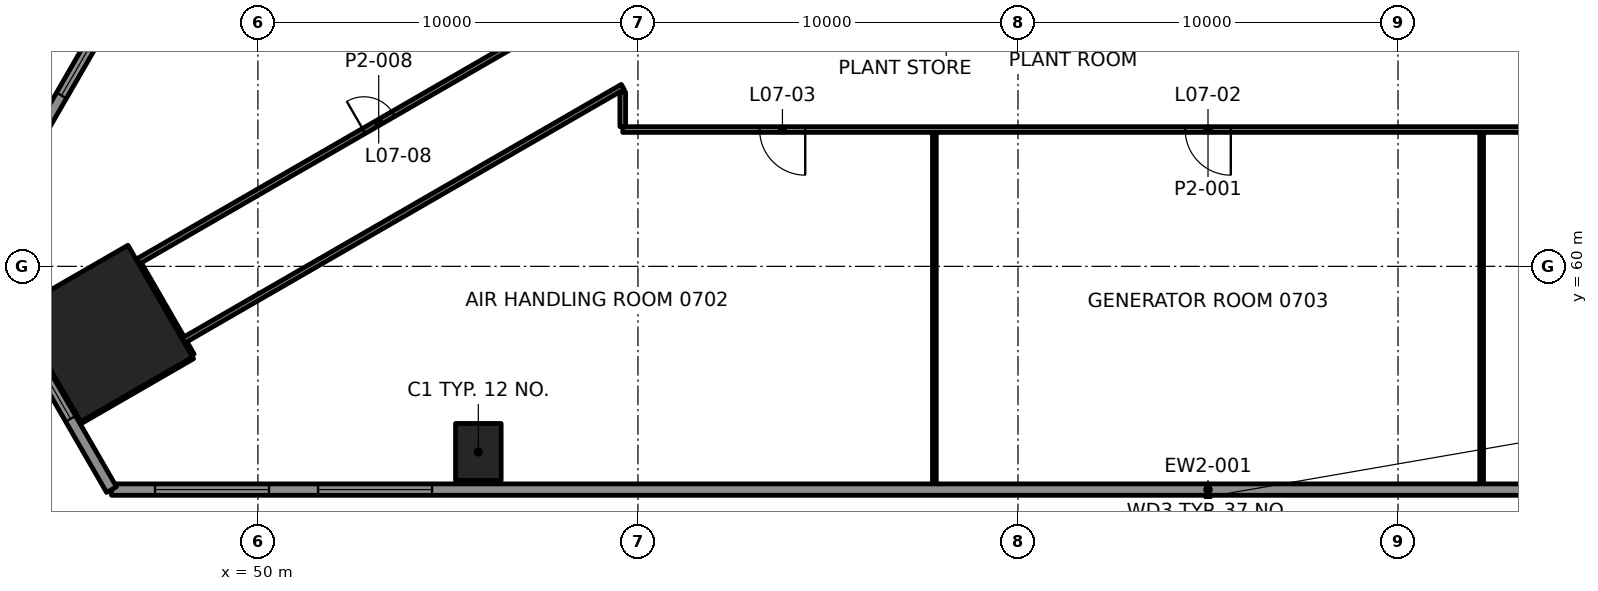
"""IFC4 building model, lengths in metres.
Left out: names, types, materials, properties, quantities, classifications, styles, units other than length and angle.
Written with IfcOpenShell. Run it as: python <this file> out.ifc"""

import sys

from ifc_helpers import new_model, si_unit, direction, frame, frame_2d, origin, origin_2d, place, context, subcontext, project, spatial, rectangle, extrude, element, fill, save


model = new_model("IFC4")
c1 = context("Model", 3, precision=1e-05, world=origin(), true_north=direction((0.0, 1.0)))
c2 = subcontext(c1, "Body", "Model", "MODEL_VIEW")
j1 = project(units=[si_unit("LENGTHUNIT", "METRE"), si_unit("PLANEANGLEUNIT", "RADIAN")], contexts=[c1])
p1 = place(None, origin())
s1 = spatial("IfcSite", under=j1, at=p1, CompositionType="ELEMENT")
p2 = place(p1, origin())
s2 = spatial("IfcBuilding", under=s1, at=p2, CompositionType="ELEMENT")
p3 = place(p2, frame((0.0, 0.0, 35.5)))
s3 = spatial("IfcBuildingStorey", under=s2, at=p3, CompositionType="ELEMENT", Elevation=35.5)
p4 = place(p3, frame((45.959, 58.233, 0.0), z_axis=(0.0, 0.0, 1.0), x_axis=(0.5, -0.866025403784, 0.0)))
e1 = element("IfcColumn", 1, at=p4, inside=s3, PredefinedType="COLUMN", context=c2, shape_type="SweptSolid", body=[
    extrude(rectangle(XDim=3.4, YDim=3.4, at=origin_2d()), origin(), (0.0, 0.0, 1.0), 4.5),
])
p5 = place(p3, frame((55.8, 55.115, -0.0), z_axis=(0.0, 0.0, 1.0), x_axis=(1.0, 0.0, 0.0)))
e2 = element("IfcColumn", 2, at=p5, inside=s3, PredefinedType="COLUMN", context=c2, shape_type="SweptSolid", body=[
    extrude(rectangle(XDim=1.2, YDim=1.5, at=origin_2d()), origin(), (0.0, 0.0, 1.0), 4.5),
])
p6 = place(p3, frame((90.4, 63.6, 0.0), z_axis=(0.0, 0.0, 1.0), x_axis=(-1.0, 0.0, 0.0)))
e3 = element("IfcWall", 3, at=p6, inside=s3, PredefinedType="PARTITIONING", context=c2, shape_type="SweptSolid", body=[
    extrude(rectangle(XDim=30.799, YDim=0.15, at=frame_2d((15.4, 0.0))), origin(), (0.0, 0.0, 1.0), 3.7),
])
p7 = place(p6, frame((3.751, 0.0, 0.0)))
e4 = element("IfcOpeningElement", 4, at=p7, cuts=e3, PredefinedType="OPENING", context=c2, shape_type="SweptSolid", body=[
    extrude(rectangle(XDim=0.9, YDim=2.1, at=frame_2d((0.45, 1.05))), frame((0.0, 0.085, 0.0), z_axis=(0.0, -1.0, 0.0), x_axis=(1.0, 0.0, 0.0)), (0.0, 0.0, 1.0), 0.17),
])
p8 = place(p6, frame((14.8, 0.0, 0.0)))
e5 = element("IfcOpeningElement", 5, at=p8, cuts=e3, PredefinedType="OPENING", context=c2, shape_type="SweptSolid", body=[
    extrude(rectangle(XDim=1.2, YDim=2.1, at=frame_2d((0.6, 1.05))), frame((0.0, 0.085, 0.0), z_axis=(0.0, -1.0, 0.0), x_axis=(1.0, 0.0, 0.0)), (0.0, 0.0, 1.0), 0.17),
])
p9 = place(p6, frame((25.998, 0.0, 0.0)))
e6 = element("IfcOpeningElement", 6, at=p9, cuts=e3, PredefinedType="OPENING", context=c2, shape_type="SweptSolid", body=[
    extrude(rectangle(XDim=1.2, YDim=2.1, at=frame_2d((0.6, 1.05))), frame((0.0, 0.085, 0.0), z_axis=(0.0, -1.0, 0.0), x_axis=(1.0, 0.0, 0.0)), (0.0, 0.0, 1.0), 0.17),
])
p10 = place(p3, frame((45.198, 55.831, 0.0), z_axis=(0.0, 0.0, 1.0), x_axis=(0.866014251095, 0.500019316528, 0.0)))
e7 = element("IfcWall", 7, at=p10, inside=s3, PredefinedType="PARTITIONING", context=c2, shape_type="SweptSolid", body=[
    extrude(rectangle(XDim=3.559, YDim=0.1, at=frame_2d((1.78, 0.0))), origin(), (0.0, 0.0, 1.0), 3.7),
])
p11 = place(p3, frame((48.031, 58.044, 0.0), z_axis=(0.0, 0.0, 1.0), x_axis=(0.866027935033, 0.499995615723, 0.0)))
e8 = element("IfcWall", 8, at=p11, inside=s3, PredefinedType="PARTITIONING", context=c2, shape_type="SweptSolid", body=[
    extrude(rectangle(XDim=13.358, YDim=0.15, at=frame_2d((6.679, 0.0))), origin(), (0.0, 0.0, 1.0), 3.547),
])
p12 = place(p3, frame((46.832, 60.123, 0.0), z_axis=(0.0, 0.0, 1.0), x_axis=(0.866022484069, 0.500005057062, 0.0)))
e9 = element("IfcWall", 9, at=p12, inside=s3, PredefinedType="PARTITIONING", context=c2, shape_type="SweptSolid", body=[
    extrude(rectangle(XDim=14.657, YDim=0.15, at=frame_2d((7.329, 0.0))), origin(), (0.0, 0.0, 1.0), 3.7),
])
p13 = place(p12, frame((6.879, 0.0, 0.0)))
e10 = element("IfcOpeningElement", 10, at=p13, cuts=e9, PredefinedType="OPENING", context=c2, shape_type="SweptSolid", body=[
    extrude(rectangle(XDim=0.9, YDim=2.1, at=frame_2d((0.45, 1.05))), frame((0.0, 0.085, 0.0), z_axis=(0.0, -1.0, 0.0), x_axis=(1.0, 0.0, 0.0)), (0.0, 0.0, 1.0), 0.17),
])
for number, where, z_axis, x_axis in (
    (11, (82.2, 54.155, 0.0), (0.0, 0.0, 1.0), (0.0, 1.0, 0.0)),
    (12, (67.8, 54.155, 0.0), (0.0, 0.0, 1.0), (0.0, 1.0, 0.0)),
):
    element("IfcWall", number, at=place(p3, frame(where, z_axis=z_axis, x_axis=x_axis)), inside=s3, PredefinedType="PARTITIONING", context=c2, shape_type="SweptSolid", body=[
        extrude(rectangle(XDim=9.37, YDim=0.1, at=frame_2d((4.685, 0.0))), origin(), (0.0, 0.0, 1.0), 3.7),
    ])
p14 = place(p3, frame((59.6, 63.676, 0.0), z_axis=(0.0, 0.0, 1.0), x_axis=(0.0, 1.0, 0.0)))
e13 = element("IfcWall", 13, at=p14, inside=s3, PredefinedType="PARTITIONING", context=c2, shape_type="SweptSolid", body=[
    extrude(rectangle(XDim=0.911, YDim=0.15, at=frame_2d((0.456, 0.0))), origin(), (0.0, 0.0, 1.0), 3.7),
])
p15 = place(p3, frame((48.256, 57.655, 0.0), z_axis=(0.0, 0.0, 1.0), x_axis=(-0.499854089722, 0.866109628736, 0.0)))
e14 = element("IfcWall", 14, at=p15, inside=s3, PredefinedType="PARTITIONING", context=c2, shape_type="SweptSolid", body=[
    extrude(rectangle(XDim=0.375, YDim=0.15, at=frame_2d((0.187, 0.0))), origin(), (0.0, 0.0, 1.0), 3.7),
])
p16 = place(p3, frame((47.993, 58.109, 0.0), z_axis=(0.0, 0.0, 1.0), x_axis=(-0.499944821793, 0.866057258594, 0.0)))
e15 = element("IfcWall", 15, at=p16, inside=s3, PredefinedType="PARTITIONING", context=c2, shape_type="SweptSolid", body=[
    extrude(rectangle(XDim=2.249, YDim=0.15, at=frame_2d((1.125, 0.0))), origin(), (0.0, 0.0, 1.0), 3.547),
])
p17 = place(p3, frame((46.148, 54.125, 0.0), z_axis=(0.0, 0.0, 1.0), x_axis=(1.0, 0.0, 0.0)))
e16 = element("IfcWall", 16, at=p17, inside=s3, PredefinedType="SOLIDWALL", context=c2, shape_type="SweptSolid", body=[
    extrude(rectangle(XDim=57.704, YDim=0.3, at=frame_2d((28.852, 0.0))), origin(), (0.0, 0.0, 1.0), 4.3),
])
p18 = place(p17, frame((1.145, 0.0, 0.8)))
e17 = element("IfcOpeningElement", 17, at=p18, cuts=e16, PredefinedType="OPENING", context=c2, shape_type="SweptSolid", body=[
    extrude(rectangle(XDim=3.0, YDim=2.4, at=frame_2d((1.5, 1.2))), frame((0.0, 0.16, 0.0), z_axis=(0.0, -1.0, 0.0), x_axis=(1.0, 0.0, 0.0)), (0.0, 0.0, 1.0), 0.32),
])
p19 = place(p17, frame((5.435, 0.0, 0.8)))
e18 = element("IfcOpeningElement", 18, at=p19, cuts=e16, PredefinedType="OPENING", context=c2, shape_type="SweptSolid", body=[
    extrude(rectangle(XDim=3.0, YDim=2.4, at=frame_2d((1.5, 1.2))), frame((0.0, 0.16, 0.0), z_axis=(0.0, -1.0, 0.0), x_axis=(1.0, 0.0, 0.0)), (0.0, 0.0, 1.0), 0.32),
])
p20 = place(p17, frame((49.269, 0.0, 0.8)))
e19 = element("IfcOpeningElement", 19, at=p20, cuts=e16, PredefinedType="OPENING", context=c2, shape_type="SweptSolid", body=[
    extrude(rectangle(XDim=3.0, YDim=2.4, at=frame_2d((1.5, 1.2))), frame((0.0, 0.16, 0.0), z_axis=(0.0, -1.0, 0.0), x_axis=(1.0, 0.0, 0.0)), (0.0, 0.0, 1.0), 0.32),
])
p21 = place(p17, frame((53.559, 0.0, 0.8)))
e20 = element("IfcOpeningElement", 20, at=p21, cuts=e16, PredefinedType="OPENING", context=c2, shape_type="SweptSolid", body=[
    extrude(rectangle(XDim=3.0, YDim=2.4, at=frame_2d((1.5, 1.2))), frame((0.0, 0.16, 0.0), z_axis=(0.0, -1.0, 0.0), x_axis=(1.0, 0.0, 0.0)), (0.0, 0.0, 1.0), 0.32),
])
p22 = place(p3, frame((107.504, 60.451, 0.0), z_axis=(0.0, 0.0, 1.0), x_axis=(-0.500000550228, 0.86602508611, 0.0)))
e21 = element("IfcWall", 21, at=p22, inside=s3, PredefinedType="SOLIDWALL", context=c2, shape_type="SweptSolid", body=[
    extrude(rectangle(XDim=57.704, YDim=0.3, at=frame_2d((28.852, 0.0))), origin(), (0.0, 0.0, 1.0), 4.3),
])
p23 = place(p22, frame((0.89, 0.0, 0.8)))
e22 = element("IfcOpeningElement", 22, at=p23, cuts=e21, PredefinedType="OPENING", context=c2, shape_type="SweptSolid", body=[
    extrude(rectangle(XDim=3.0, YDim=2.4, at=frame_2d((1.5, 1.2))), frame((0.0, 0.16, 0.0), z_axis=(0.0, -1.0, 0.0), x_axis=(1.0, 0.0, 0.0)), (0.0, 0.0, 1.0), 0.32),
])
p24 = place(p22, frame((4.67, 0.0, 0.8)))
e23 = element("IfcOpeningElement", 23, at=p24, cuts=e21, PredefinedType="OPENING", context=c2, shape_type="SweptSolid", body=[
    extrude(rectangle(XDim=3.0, YDim=2.4, at=frame_2d((1.5, 1.2))), frame((0.0, 0.16, 0.0), z_axis=(0.0, -1.0, 0.0), x_axis=(1.0, 0.0, 0.0)), (0.0, 0.0, 1.0), 0.32),
])
p25 = place(p22, frame((8.451, 0.0, 0.8)))
e24 = element("IfcOpeningElement", 24, at=p25, cuts=e21, PredefinedType="OPENING", context=c2, shape_type="SweptSolid", body=[
    extrude(rectangle(XDim=3.0, YDim=2.4, at=frame_2d((1.5, 1.2))), frame((0.0, 0.16, 0.0), z_axis=(0.0, -1.0, 0.0), x_axis=(1.0, 0.0, 0.0)), (0.0, 0.0, 1.0), 0.32),
])
p26 = place(p22, frame((12.231, 0.0, 0.8)))
e25 = element("IfcOpeningElement", 25, at=p26, cuts=e21, PredefinedType="OPENING", context=c2, shape_type="SweptSolid", body=[
    extrude(rectangle(XDim=3.0, YDim=2.4, at=frame_2d((1.5, 1.2))), frame((0.0, 0.16, 0.0), z_axis=(0.0, -1.0, 0.0), x_axis=(1.0, 0.0, 0.0)), (0.0, 0.0, 1.0), 0.32),
])
p27 = place(p22, frame((16.011, 0.0, 0.8)))
e26 = element("IfcOpeningElement", 26, at=p27, cuts=e21, PredefinedType="OPENING", context=c2, shape_type="SweptSolid", body=[
    extrude(rectangle(XDim=3.0, YDim=2.4, at=frame_2d((1.5, 1.2))), frame((0.0, 0.16, 0.0), z_axis=(0.0, -1.0, 0.0), x_axis=(1.0, 0.0, 0.0)), (0.0, 0.0, 1.0), 0.32),
])
p28 = place(p22, frame((19.792, 0.0, 0.8)))
e27 = element("IfcOpeningElement", 27, at=p28, cuts=e21, PredefinedType="OPENING", context=c2, shape_type="SweptSolid", body=[
    extrude(rectangle(XDim=3.0, YDim=2.4, at=frame_2d((1.5, 1.2))), frame((0.0, 0.16, 0.0), z_axis=(0.0, -1.0, 0.0), x_axis=(1.0, 0.0, 0.0)), (0.0, 0.0, 1.0), 0.32),
])
p29 = place(p22, frame((23.572, 0.0, 0.8)))
e28 = element("IfcOpeningElement", 28, at=p29, cuts=e21, PredefinedType="OPENING", context=c2, shape_type="SweptSolid", body=[
    extrude(rectangle(XDim=3.0, YDim=2.4, at=frame_2d((1.5, 1.2))), frame((0.0, 0.16, 0.0), z_axis=(0.0, -1.0, 0.0), x_axis=(1.0, 0.0, 0.0)), (0.0, 0.0, 1.0), 0.32),
])
p30 = place(p22, frame((27.352, 0.0, 0.8)))
e29 = element("IfcOpeningElement", 29, at=p30, cuts=e21, PredefinedType="OPENING", context=c2, shape_type="SweptSolid", body=[
    extrude(rectangle(XDim=3.0, YDim=2.4, at=frame_2d((1.5, 1.2))), frame((0.0, 0.16, 0.0), z_axis=(0.0, -1.0, 0.0), x_axis=(1.0, 0.0, 0.0)), (0.0, 0.0, 1.0), 0.32),
])
p31 = place(p22, frame((31.132, 0.0, 0.8)))
e30 = element("IfcOpeningElement", 30, at=p31, cuts=e21, PredefinedType="OPENING", context=c2, shape_type="SweptSolid", body=[
    extrude(rectangle(XDim=3.0, YDim=2.4, at=frame_2d((1.5, 1.2))), frame((0.0, 0.16, 0.0), z_axis=(0.0, -1.0, 0.0), x_axis=(1.0, 0.0, 0.0)), (0.0, 0.0, 1.0), 0.32),
])
p32 = place(p22, frame((34.913, 0.0, 0.8)))
e31 = element("IfcOpeningElement", 31, at=p32, cuts=e21, PredefinedType="OPENING", context=c2, shape_type="SweptSolid", body=[
    extrude(rectangle(XDim=3.0, YDim=2.4, at=frame_2d((1.5, 1.2))), frame((0.0, 0.16, 0.0), z_axis=(0.0, -1.0, 0.0), x_axis=(1.0, 0.0, 0.0)), (0.0, 0.0, 1.0), 0.32),
])
p33 = place(p22, frame((38.693, 0.0, 0.8)))
e32 = element("IfcOpeningElement", 32, at=p33, cuts=e21, PredefinedType="OPENING", context=c2, shape_type="SweptSolid", body=[
    extrude(rectangle(XDim=3.0, YDim=2.4, at=frame_2d((1.5, 1.2))), frame((0.0, 0.16, 0.0), z_axis=(0.0, -1.0, 0.0), x_axis=(1.0, 0.0, 0.0)), (0.0, 0.0, 1.0), 0.32),
])
p34 = place(p22, frame((42.473, 0.0, 0.8)))
e33 = element("IfcOpeningElement", 33, at=p34, cuts=e21, PredefinedType="OPENING", context=c2, shape_type="SweptSolid", body=[
    extrude(rectangle(XDim=3.0, YDim=2.4, at=frame_2d((1.5, 1.2))), frame((0.0, 0.16, 0.0), z_axis=(0.0, -1.0, 0.0), x_axis=(1.0, 0.0, 0.0)), (0.0, 0.0, 1.0), 0.32),
])
p35 = place(p22, frame((46.253, 0.0, 0.8)))
e34 = element("IfcOpeningElement", 34, at=p35, cuts=e21, PredefinedType="OPENING", context=c2, shape_type="SweptSolid", body=[
    extrude(rectangle(XDim=3.0, YDim=2.4, at=frame_2d((1.5, 1.2))), frame((0.0, 0.16, 0.0), z_axis=(0.0, -1.0, 0.0), x_axis=(1.0, 0.0, 0.0)), (0.0, 0.0, 1.0), 0.32),
])
p36 = place(p22, frame((50.033, 0.0, 0.8)))
e35 = element("IfcOpeningElement", 35, at=p36, cuts=e21, PredefinedType="OPENING", context=c2, shape_type="SweptSolid", body=[
    extrude(rectangle(XDim=3.0, YDim=2.4, at=frame_2d((1.5, 1.2))), frame((0.0, 0.16, 0.0), z_axis=(0.0, -1.0, 0.0), x_axis=(1.0, 0.0, 0.0)), (0.0, 0.0, 1.0), 0.32),
])
p37 = place(p22, frame((53.814, 0.0, 0.8)))
e36 = element("IfcOpeningElement", 36, at=p37, cuts=e21, PredefinedType="OPENING", context=c2, shape_type="SweptSolid", body=[
    extrude(rectangle(XDim=3.0, YDim=2.4, at=frame_2d((1.5, 1.2))), frame((0.0, 0.16, 0.0), z_axis=(0.0, -1.0, 0.0), x_axis=(1.0, 0.0, 0.0)), (0.0, 0.0, 1.0), 0.32),
])
p38 = place(p3, frame((71.348, 110.424, 0.0), z_axis=(0.0, 0.0, 1.0), x_axis=(-0.500000550228, -0.86602508611, 0.0)))
e37 = element("IfcWall", 37, at=p38, inside=s3, PredefinedType="SOLIDWALL", context=c2, shape_type="SweptSolid", body=[
    extrude(rectangle(XDim=57.704, YDim=0.3, at=frame_2d((28.852, 0.0))), origin(), (0.0, 0.0, 1.0), 4.3),
])
p39 = place(p38, frame((0.89, 0.0, 0.8)))
e38 = element("IfcOpeningElement", 38, at=p39, cuts=e37, PredefinedType="OPENING", context=c2, shape_type="SweptSolid", body=[
    extrude(rectangle(XDim=3.0, YDim=2.4, at=frame_2d((1.5, 1.2))), frame((0.0, 0.16, 0.0), z_axis=(0.0, -1.0, 0.0), x_axis=(1.0, 0.0, 0.0)), (0.0, 0.0, 1.0), 0.32),
])
p40 = place(p38, frame((4.67, 0.0, 0.8)))
e39 = element("IfcOpeningElement", 39, at=p40, cuts=e37, PredefinedType="OPENING", context=c2, shape_type="SweptSolid", body=[
    extrude(rectangle(XDim=3.0, YDim=2.4, at=frame_2d((1.5, 1.2))), frame((0.0, 0.16, 0.0), z_axis=(0.0, -1.0, 0.0), x_axis=(1.0, 0.0, 0.0)), (0.0, 0.0, 1.0), 0.32),
])
p41 = place(p38, frame((8.451, 0.0, 0.8)))
e40 = element("IfcOpeningElement", 40, at=p41, cuts=e37, PredefinedType="OPENING", context=c2, shape_type="SweptSolid", body=[
    extrude(rectangle(XDim=3.0, YDim=2.4, at=frame_2d((1.5, 1.2))), frame((0.0, 0.16, 0.0), z_axis=(0.0, -1.0, 0.0), x_axis=(1.0, 0.0, 0.0)), (0.0, 0.0, 1.0), 0.32),
])
p42 = place(p38, frame((12.231, 0.0, 0.8)))
e41 = element("IfcOpeningElement", 41, at=p42, cuts=e37, PredefinedType="OPENING", context=c2, shape_type="SweptSolid", body=[
    extrude(rectangle(XDim=3.0, YDim=2.4, at=frame_2d((1.5, 1.2))), frame((0.0, 0.16, 0.0), z_axis=(0.0, -1.0, 0.0), x_axis=(1.0, 0.0, 0.0)), (0.0, 0.0, 1.0), 0.32),
])
p43 = place(p38, frame((16.011, 0.0, 0.8)))
e42 = element("IfcOpeningElement", 42, at=p43, cuts=e37, PredefinedType="OPENING", context=c2, shape_type="SweptSolid", body=[
    extrude(rectangle(XDim=3.0, YDim=2.4, at=frame_2d((1.5, 1.2))), frame((0.0, 0.16, 0.0), z_axis=(0.0, -1.0, 0.0), x_axis=(1.0, 0.0, 0.0)), (0.0, 0.0, 1.0), 0.32),
])
p44 = place(p38, frame((19.792, 0.0, 0.8)))
e43 = element("IfcOpeningElement", 43, at=p44, cuts=e37, PredefinedType="OPENING", context=c2, shape_type="SweptSolid", body=[
    extrude(rectangle(XDim=3.0, YDim=2.4, at=frame_2d((1.5, 1.2))), frame((0.0, 0.16, 0.0), z_axis=(0.0, -1.0, 0.0), x_axis=(1.0, 0.0, 0.0)), (0.0, 0.0, 1.0), 0.32),
])
p45 = place(p38, frame((23.572, 0.0, 0.8)))
e44 = element("IfcOpeningElement", 44, at=p45, cuts=e37, PredefinedType="OPENING", context=c2, shape_type="SweptSolid", body=[
    extrude(rectangle(XDim=3.0, YDim=2.4, at=frame_2d((1.5, 1.2))), frame((0.0, 0.16, 0.0), z_axis=(0.0, -1.0, 0.0), x_axis=(1.0, 0.0, 0.0)), (0.0, 0.0, 1.0), 0.32),
])
p46 = place(p38, frame((27.352, 0.0, 0.8)))
e45 = element("IfcOpeningElement", 45, at=p46, cuts=e37, PredefinedType="OPENING", context=c2, shape_type="SweptSolid", body=[
    extrude(rectangle(XDim=3.0, YDim=2.4, at=frame_2d((1.5, 1.2))), frame((0.0, 0.16, 0.0), z_axis=(0.0, -1.0, 0.0), x_axis=(1.0, 0.0, 0.0)), (0.0, 0.0, 1.0), 0.32),
])
p47 = place(p38, frame((31.132, 0.0, 0.8)))
e46 = element("IfcOpeningElement", 46, at=p47, cuts=e37, PredefinedType="OPENING", context=c2, shape_type="SweptSolid", body=[
    extrude(rectangle(XDim=3.0, YDim=2.4, at=frame_2d((1.5, 1.2))), frame((0.0, 0.16, 0.0), z_axis=(0.0, -1.0, 0.0), x_axis=(1.0, 0.0, 0.0)), (0.0, 0.0, 1.0), 0.32),
])
p48 = place(p38, frame((34.913, 0.0, 0.8)))
e47 = element("IfcOpeningElement", 47, at=p48, cuts=e37, PredefinedType="OPENING", context=c2, shape_type="SweptSolid", body=[
    extrude(rectangle(XDim=3.0, YDim=2.4, at=frame_2d((1.5, 1.2))), frame((0.0, 0.16, 0.0), z_axis=(0.0, -1.0, 0.0), x_axis=(1.0, 0.0, 0.0)), (0.0, 0.0, 1.0), 0.32),
])
p49 = place(p38, frame((38.693, 0.0, 0.8)))
e48 = element("IfcOpeningElement", 48, at=p49, cuts=e37, PredefinedType="OPENING", context=c2, shape_type="SweptSolid", body=[
    extrude(rectangle(XDim=3.0, YDim=2.4, at=frame_2d((1.5, 1.2))), frame((0.0, 0.16, 0.0), z_axis=(0.0, -1.0, 0.0), x_axis=(1.0, 0.0, 0.0)), (0.0, 0.0, 1.0), 0.32),
])
p50 = place(p38, frame((42.473, 0.0, 0.8)))
e49 = element("IfcOpeningElement", 49, at=p50, cuts=e37, PredefinedType="OPENING", context=c2, shape_type="SweptSolid", body=[
    extrude(rectangle(XDim=3.0, YDim=2.4, at=frame_2d((1.5, 1.2))), frame((0.0, 0.16, 0.0), z_axis=(0.0, -1.0, 0.0), x_axis=(1.0, 0.0, 0.0)), (0.0, 0.0, 1.0), 0.32),
])
p51 = place(p38, frame((46.253, 0.0, 0.8)))
e50 = element("IfcOpeningElement", 50, at=p51, cuts=e37, PredefinedType="OPENING", context=c2, shape_type="SweptSolid", body=[
    extrude(rectangle(XDim=3.0, YDim=2.4, at=frame_2d((1.5, 1.2))), frame((0.0, 0.16, 0.0), z_axis=(0.0, -1.0, 0.0), x_axis=(1.0, 0.0, 0.0)), (0.0, 0.0, 1.0), 0.32),
])
p52 = place(p38, frame((50.033, 0.0, 0.8)))
e51 = element("IfcOpeningElement", 51, at=p52, cuts=e37, PredefinedType="OPENING", context=c2, shape_type="SweptSolid", body=[
    extrude(rectangle(XDim=3.0, YDim=2.4, at=frame_2d((1.5, 1.2))), frame((0.0, 0.16, 0.0), z_axis=(0.0, -1.0, 0.0), x_axis=(1.0, 0.0, 0.0)), (0.0, 0.0, 1.0), 0.32),
])
p53 = place(p38, frame((53.814, 0.0, 0.8)))
e52 = element("IfcOpeningElement", 52, at=p53, cuts=e37, PredefinedType="OPENING", context=c2, shape_type="SweptSolid", body=[
    extrude(rectangle(XDim=3.0, YDim=2.4, at=frame_2d((1.5, 1.2))), frame((0.0, 0.16, 0.0), z_axis=(0.0, -1.0, 0.0), x_axis=(1.0, 0.0, 0.0)), (0.0, 0.0, 1.0), 0.32),
])
p54 = place(p3, frame((42.496, 60.451, 0.0), z_axis=(0.0, 0.0, 1.0), x_axis=(0.500000231294, -0.866025270247, 0.0)))
e53 = element("IfcWall", 53, at=p54, inside=s3, PredefinedType="SOLIDWALL", context=c2, shape_type="SweptSolid", body=[
    extrude(rectangle(XDim=7.304, YDim=0.3, at=frame_2d((3.652, 0.0))), origin(), (0.0, 0.0, 1.0), 4.3),
])
p55 = place(p54, frame((2.152, 0.0, 0.8)))
e54 = element("IfcOpeningElement", 54, at=p55, cuts=e53, PredefinedType="OPENING", context=c2, shape_type="SweptSolid", body=[
    extrude(rectangle(XDim=3.0, YDim=2.4, at=frame_2d((1.5, 1.2))), frame((0.0, 0.16, 0.0), z_axis=(0.0, -1.0, 0.0), x_axis=(1.0, 0.0, 0.0)), (0.0, 0.0, 1.0), 0.32),
])
p56 = place(p8, origin())
e55 = element("IfcDoor", 55, at=p56, inside=s3, OperationType="DOUBLE_DOOR_SINGLE_SWING", PredefinedType="DOOR", context=c2, shape_type="SweptSolid", body=[
    extrude(rectangle(XDim=1.2, YDim=2.1, at=frame_2d((0.6, 1.05))), frame((0.0, 0.025, 0.0), z_axis=(0.0, -1.0, 0.0), x_axis=(1.0, 0.0, 0.0)), (0.0, 0.0, 1.0), 0.05),
])
fill(e5, e55)
p57 = place(p9, origin())
e56 = element("IfcDoor", 56, at=p57, inside=s3, OperationType="DOUBLE_DOOR_SINGLE_SWING", PredefinedType="DOOR", context=c2, shape_type="SweptSolid", body=[
    extrude(rectangle(XDim=1.2, YDim=2.1, at=frame_2d((0.6, 1.05))), frame((0.0, 0.025, 0.0), z_axis=(0.0, -1.0, 0.0), x_axis=(1.0, 0.0, 0.0)), (0.0, 0.0, 1.0), 0.05),
])
fill(e6, e56)
p58 = place(p13, origin())
e57 = element("IfcDoor", 57, at=p58, inside=s3, OperationType="SINGLE_SWING_RIGHT", PredefinedType="DOOR", context=c2, shape_type="SweptSolid", body=[
    extrude(rectangle(XDim=0.9, YDim=2.1, at=frame_2d((0.45, 1.05))), frame((0.0, 0.025, 0.0), z_axis=(0.0, -1.0, 0.0), x_axis=(1.0, 0.0, 0.0)), (0.0, 0.0, 1.0), 0.05),
])
fill(e10, e57)
p59 = place(p18, origin())
e58 = element("IfcWindow", 58, at=p59, inside=s3, PartitioningType="SINGLE_PANEL", PredefinedType="WINDOW", context=c2, shape_type="SweptSolid", body=[
    extrude(rectangle(XDim=3.0, YDim=2.4, at=frame_2d((1.5, 1.2))), frame((0.0, 0.03, 0.0), z_axis=(0.0, -1.0, 0.0), x_axis=(1.0, 0.0, 0.0)), (0.0, 0.0, 1.0), 0.06),
])
fill(e17, e58)
p60 = place(p19, origin())
e59 = element("IfcWindow", 59, at=p60, inside=s3, PartitioningType="SINGLE_PANEL", PredefinedType="WINDOW", context=c2, shape_type="SweptSolid", body=[
    extrude(rectangle(XDim=3.0, YDim=2.4, at=frame_2d((1.5, 1.2))), frame((0.0, 0.03, 0.0), z_axis=(0.0, -1.0, 0.0), x_axis=(1.0, 0.0, 0.0)), (0.0, 0.0, 1.0), 0.06),
])
fill(e18, e59)
p61 = place(p52, origin())
e60 = element("IfcWindow", 60, at=p61, inside=s3, PartitioningType="SINGLE_PANEL", PredefinedType="WINDOW", context=c2, shape_type="SweptSolid", body=[
    extrude(rectangle(XDim=3.0, YDim=2.4, at=frame_2d((1.5, 1.2))), frame((0.0, 0.03, 0.0), z_axis=(0.0, -1.0, 0.0), x_axis=(1.0, 0.0, 0.0)), (0.0, 0.0, 1.0), 0.06),
])
fill(e51, e60)
p62 = place(p55, origin())
e61 = element("IfcWindow", 61, at=p62, inside=s3, PartitioningType="SINGLE_PANEL", PredefinedType="WINDOW", context=c2, shape_type="SweptSolid", body=[
    extrude(rectangle(XDim=3.0, YDim=2.4, at=frame_2d((1.5, 1.2))), frame((0.0, 0.03, 0.0), z_axis=(0.0, -1.0, 0.0), x_axis=(1.0, 0.0, 0.0)), (0.0, 0.0, 1.0), 0.06),
])
fill(e54, e61)
save(model, sys.argv[1])
